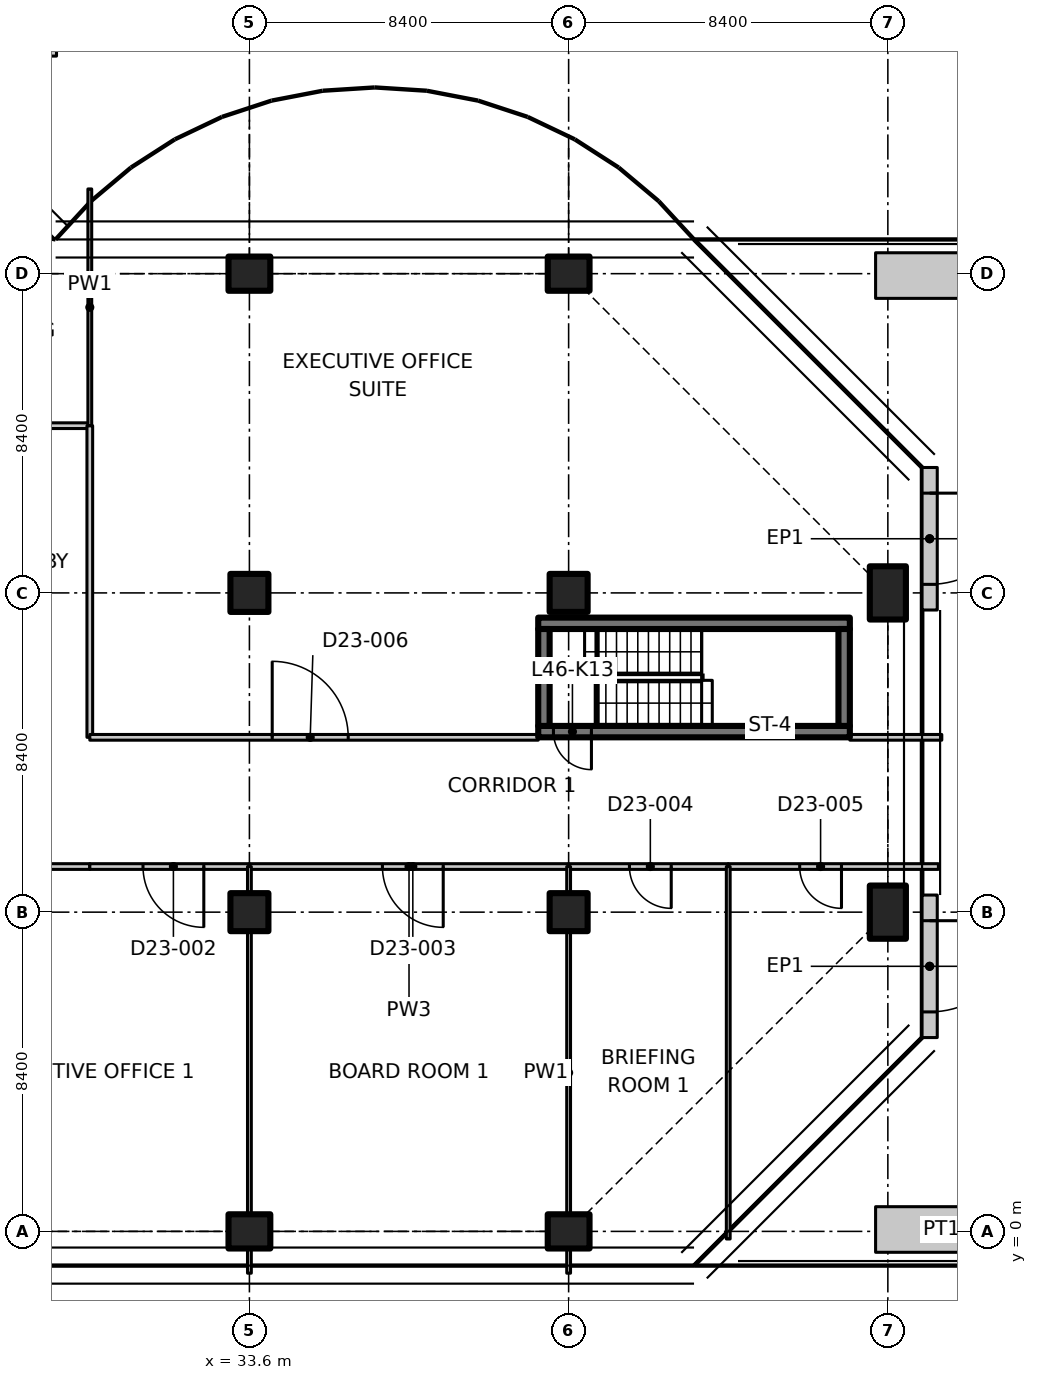
"""IFC4 building model, lengths in metres.
Left out: names, types, materials, properties, quantities, classifications, styles, units other than length and angle.
Written with IfcOpenShell. Run it as: python <this file> out.ifc"""

import sys

from ifc_helpers import new_model, si_unit, direction, frame, frame_2d, origin, origin_2d, place, context, subcontext, project, spatial, polyline, rectangle, outline, extrude, element, fill, save


model = new_model("IFC4")
c1 = context("Model", 3, precision=1e-05, world=origin(), true_north=direction((0.0, 1.0)))
c2 = subcontext(c1, "Body", "Model", "MODEL_VIEW")
j1 = project(units=[si_unit("LENGTHUNIT", "METRE"), si_unit("PLANEANGLEUNIT", "RADIAN")], contexts=[c1])
p1 = place(None, origin())
s1 = spatial("IfcSite", under=j1, at=p1, CompositionType="ELEMENT")
p2 = place(p1, origin())
s2 = spatial("IfcBuilding", under=s1, at=p2, CompositionType="ELEMENT")
p3 = place(p2, frame((0.0, 0.0, 184.8)))
s3 = spatial("IfcBuildingStorey", under=s2, at=p3, CompositionType="ELEMENT", Elevation=184.8)
p4 = place(p3, frame((33.6, 0.0, 0.0), z_axis=(0.0, 0.0, 1.0), x_axis=(0.0, 1.0, 0.0)))
e1 = element("IfcColumn", 1, at=p4, inside=s3, PredefinedType="COLUMN", context=c2, shape_type="SweptSolid", body=[
    extrude(rectangle(XDim=0.9, YDim=1.1, at=origin_2d()), origin(), (0.0, 0.0, 1.0), 3.35),
])
for number, where, z_axis, x_axis in (
    (2, (33.6, 8.4, 0.0), (0.0, 0.0, 1.0), (1.0, 0.0, 0.0)),
    (3, (33.6, 16.8, 0.0), (0.0, 0.0, 1.0), (1.0, 0.0, 0.0)),
):
    element("IfcColumn", number, at=place(p3, frame(where, z_axis=z_axis, x_axis=x_axis)), inside=s3, PredefinedType="COLUMN", context=c2, shape_type="SweptSolid", body=[
        extrude(rectangle(XDim=1.0, YDim=1.0, at=origin_2d()), origin(), (0.0, 0.0, 1.0), 3.35),
    ])
for number, where, z_axis, x_axis in (
    (4, (33.6, 25.2, 0.0), (0.0, 0.0, 1.0), (0.0, 1.0, 0.0)),
    (5, (42.0, 0.0, 0.0), (0.0, 0.0, 1.0), (0.0, 1.0, 0.0)),
):
    element("IfcColumn", number, at=place(p3, frame(where, z_axis=z_axis, x_axis=x_axis)), inside=s3, PredefinedType="COLUMN", context=c2, shape_type="SweptSolid", body=[
        extrude(rectangle(XDim=0.9, YDim=1.1, at=origin_2d()), origin(), (0.0, 0.0, 1.0), 3.35),
    ])
for number, where, z_axis, x_axis in (
    (6, (42.0, 8.4, 0.0), (0.0, 0.0, 1.0), (1.0, 0.0, 0.0)),
    (7, (42.0, 16.8, 0.0), (0.0, 0.0, 1.0), (1.0, 0.0, 0.0)),
):
    element("IfcColumn", number, at=place(p3, frame(where, z_axis=z_axis, x_axis=x_axis)), inside=s3, PredefinedType="COLUMN", context=c2, shape_type="SweptSolid", body=[
        extrude(rectangle(XDim=1.0, YDim=1.0, at=origin_2d()), origin(), (0.0, 0.0, 1.0), 3.35),
    ])
p5 = place(p3, frame((42.0, 25.2, 0.0), z_axis=(0.0, 0.0, 1.0), x_axis=(0.0, 1.0, 0.0)))
e8 = element("IfcColumn", 8, at=p5, inside=s3, PredefinedType="COLUMN", context=c2, shape_type="SweptSolid", body=[
    extrude(rectangle(XDim=0.9, YDim=1.1, at=origin_2d()), origin(), (0.0, 0.0, 1.0), 3.35),
])
for number, where, z_axis, x_axis in (
    (9, (50.4, 8.4, 0.0), (0.0, 0.0, 1.0), (1.0, 0.0, 0.0)),
    (10, (50.4, 16.8, 0.0), (0.0, 0.0, 1.0), (1.0, 0.0, 0.0)),
):
    element("IfcColumn", number, at=place(p3, frame(where, z_axis=z_axis, x_axis=x_axis)), inside=s3, PredefinedType="COLUMN", context=c2, shape_type="SweptSolid", body=[
        extrude(rectangle(XDim=0.95, YDim=1.4, at=origin_2d()), origin(), (0.0, 0.0, 1.0), 3.35),
    ])
p6 = place(p3, frame((51.5, 8.85, 0.0), z_axis=(0.0, 0.0, 1.0), x_axis=(0.0, -1.0, 0.0)))
e11 = element("IfcWall", 11, at=p6, inside=s3, PredefinedType="SOLIDWALL", context=c2, shape_type="SweptSolid", body=[
    extrude(rectangle(XDim=3.75, YDim=0.4, at=frame_2d((1.875, 0.0))), origin(), (0.0, 0.0, 1.0), 3.35),
])
p7 = place(p6, frame((0.675, 0.0, 0.0)))
e12 = element("IfcOpeningElement", 12, at=p7, cuts=e11, PredefinedType="OPENING", context=c2, shape_type="SweptSolid", body=[
    extrude(rectangle(XDim=2.4, YDim=2.7, at=frame_2d((1.2, 1.35))), frame((0.0, 0.21, 0.0), z_axis=(0.0, -1.0, 0.0), x_axis=(1.0, 0.0, 0.0)), (0.0, 0.0, 1.0), 0.42),
])
p8 = place(p3, frame((51.5, 20.1, 0.0), z_axis=(0.0, 0.0, 1.0), x_axis=(0.0, -1.0, 0.0)))
e13 = element("IfcWall", 13, at=p8, inside=s3, PredefinedType="SOLIDWALL", context=c2, shape_type="SweptSolid", body=[
    extrude(rectangle(XDim=3.75, YDim=0.4, at=frame_2d((1.875, 0.0))), origin(), (0.0, 0.0, 1.0), 3.35),
])
p9 = place(p8, frame((0.675, 0.0, 0.0)))
e14 = element("IfcOpeningElement", 14, at=p9, cuts=e13, PredefinedType="OPENING", context=c2, shape_type="SweptSolid", body=[
    extrude(rectangle(XDim=2.4, YDim=2.7, at=frame_2d((1.2, 1.35))), frame((0.0, 0.21, 0.0), z_axis=(0.0, -1.0, 0.0), x_axis=(1.0, 0.0, 0.0)), (0.0, 0.0, 1.0), 0.42),
])
p10 = place(p3, frame((50.077, 0.05, 0.0), z_axis=(0.0, 0.0, 1.0), x_axis=(1.0, 0.0, 0.0)))
e15 = element("IfcWall", 15, at=p10, inside=s3, PredefinedType="PARAPET", context=c2, shape_type="SweptSolid", body=[
    extrude(rectangle(XDim=3.478, YDim=1.2, at=frame_2d((1.739, 0.0))), origin(), (0.0, 0.0, 1.0), 1.3),
])
p11 = place(p3, frame((52.707, 25.15, 0.0), z_axis=(0.0, 0.0, 1.0), x_axis=(-1.0, 0.0, 0.0)))
e16 = element("IfcWall", 16, at=p11, inside=s3, PredefinedType="PARAPET", context=c2, shape_type="SweptSolid", body=[
    extrude(rectangle(XDim=2.629, YDim=1.2, at=frame_2d((1.314, 0.0))), origin(), (0.0, 0.0, 1.0), 1.3),
])
p12 = place(p3, frame((49.4, 13.15, 0.0), z_axis=(0.0, 0.0, 1.0), x_axis=(-1.0, 0.0, 0.0)))
e17 = element("IfcWall", 17, at=p12, inside=s3, PredefinedType="SHEAR", context=c2, shape_type="SweptSolid", body=[
    extrude(rectangle(XDim=8.2, YDim=0.3, at=frame_2d((4.1, 0.0))), origin(), (0.0, 0.0, 1.0), 3.35),
])
p13 = place(p12, frame((6.8, 0.0, 0.0)))
e18 = element("IfcOpeningElement", 18, at=p13, cuts=e17, PredefinedType="OPENING", context=c2, shape_type="SweptSolid", body=[
    extrude(rectangle(XDim=1.0, YDim=2.1, at=frame_2d((0.5, 1.05))), frame((0.0, 0.16, 0.0), z_axis=(0.0, -1.0, 0.0), x_axis=(1.0, 0.0, 0.0)), (0.0, 0.0, 1.0), 0.32),
])
p14 = place(p3, frame((41.2, 16.0, 0.0), z_axis=(0.0, 0.0, 1.0), x_axis=(1.0, 0.0, 0.0)))
e19 = element("IfcWall", 19, at=p14, inside=s3, PredefinedType="SHEAR", context=c2, shape_type="SweptSolid", body=[
    extrude(rectangle(XDim=8.2, YDim=0.3, at=frame_2d((4.1, 0.0))), origin(), (0.0, 0.0, 1.0), 3.35),
])
for number, where, z_axis, x_axis in (
    (20, (41.35, 13.3, 0.0), (0.0, 0.0, 1.0), (0.0, 1.0, 0.0)),
    (21, (49.25, 13.3, 0.0), (0.0, 0.0, 1.0), (0.0, 1.0, 0.0)),
):
    element("IfcWall", number, at=place(p3, frame(where, z_axis=z_axis, x_axis=x_axis)), inside=s3, PredefinedType="SHEAR", context=c2, shape_type="SweptSolid", body=[
        extrude(rectangle(XDim=2.55, YDim=0.3, at=frame_2d((1.275, 0.0))), origin(), (0.0, 0.0, 1.0), 3.35),
    ])
for number, where, z_axis, x_axis in (
    (22, (25.2, 21.2, 0.0), (0.0, 0.0, 1.0), (1.0, 0.0, 0.0)),
    (23, (29.4, 9.6, 0.0), (0.0, 0.0, 1.0), (-1.0, 0.0, 0.0)),
):
    element("IfcWall", number, at=place(p3, frame(where, z_axis=z_axis, x_axis=x_axis)), inside=s3, PredefinedType="PARTITIONING", context=c2, shape_type="SweptSolid", body=[
        extrude(rectangle(XDim=4.2, YDim=0.15, at=frame_2d((2.1, 0.0))), origin(), (0.0, 0.0, 1.0), 3.33),
    ])
p15 = place(p3, frame((29.4, 21.2, 0.0), z_axis=(0.0, 0.0, 1.0), x_axis=(0.0, -1.0, 0.0)))
e24 = element("IfcWall", 24, at=p15, inside=s3, PredefinedType="PARTITIONING", context=c2, shape_type="SweptSolid", body=[
    extrude(rectangle(XDim=8.2, YDim=0.15, at=frame_2d((4.1, 0.0))), origin(), (0.0, 0.0, 1.0), 3.33),
])
p16 = place(p3, frame((29.4, 27.429, 0.0), z_axis=(0.0, 0.0, 1.0), x_axis=(0.0, -1.0, 0.0)))
e25 = element("IfcWall", 25, at=p16, inside=s3, PredefinedType="PARTITIONING", context=c2, shape_type="SweptSolid", body=[
    extrude(outline(polyline([(0.0, 0.0), (6.229, 0.0), (6.229, 3.33), (2.679, 3.33), (2.677, 2.98), (1.781, 2.98), (1.779, 3.33), (0.154, 3.33), (0.0, 3.33), (0.0, 0.0)])), frame((0.0, 0.05, 0.0), z_axis=(0.0, -1.0, 0.0), x_axis=(1.0, 0.0, 0.0)), (0.0, 0.0, 1.0), 0.1),
])
p17 = place(p3, frame((25.2, 31.0, 0.0), z_axis=(0.0, 0.0, 1.0), x_axis=(1.0, 0.0, 0.0)))
e26 = element("IfcWall", 26, at=p17, inside=s3, PredefinedType="PARTITIONING", context=c2, shape_type="SweptSolid", body=[
    extrude(rectangle(XDim=3.324, YDim=0.15, at=frame_2d((1.662, 0.0))), origin(), (0.0, 0.0, 1.0), 2.98),
])
p18 = place(p3, frame((33.6, 9.6, 0.0), z_axis=(0.0, 0.0, 1.0), x_axis=(-1.0, 0.0, 0.0)))
e27 = element("IfcWall", 27, at=p18, inside=s3, PredefinedType="PARTITIONING", context=c2, shape_type="SweptSolid", body=[
    extrude(rectangle(XDim=4.2, YDim=0.15, at=frame_2d((2.1, 0.0))), origin(), (0.0, 0.0, 1.0), 3.33),
])
p19 = place(p18, frame((1.2, 0.0, 0.0)))
e28 = element("IfcOpeningElement", 28, at=p19, cuts=e27, PredefinedType="OPENING", context=c2, shape_type="SweptSolid", body=[
    extrude(rectangle(XDim=1.6, YDim=2.1, at=frame_2d((0.8, 1.05))), frame((0.0, 0.085, 0.0), z_axis=(0.0, -1.0, 0.0), x_axis=(1.0, 0.0, 0.0)), (0.0, 0.0, 1.0), 0.17),
])
p20 = place(p3, frame((42.0, 9.6, 0.0), z_axis=(0.0, 0.0, 1.0), x_axis=(-1.0, 0.0, 0.0)))
e29 = element("IfcWall", 29, at=p20, inside=s3, PredefinedType="PARTITIONING", context=c2, shape_type="SweptSolid", body=[
    extrude(rectangle(XDim=8.4, YDim=0.15, at=frame_2d((4.2, 0.0))), origin(), (0.0, 0.0, 1.0), 3.33),
])
p21 = place(p20, frame((3.3, 0.0, 0.0)))
e30 = element("IfcOpeningElement", 30, at=p21, cuts=e29, PredefinedType="OPENING", context=c2, shape_type="SweptSolid", body=[
    extrude(rectangle(XDim=1.6, YDim=2.1, at=frame_2d((0.8, 1.05))), frame((0.0, 0.085, 0.0), z_axis=(0.0, -1.0, 0.0), x_axis=(1.0, 0.0, 0.0)), (0.0, 0.0, 1.0), 0.17),
])
p22 = place(p3, frame((46.2, 9.6, 0.0), z_axis=(0.0, 0.0, 1.0), x_axis=(-1.0, 0.0, 0.0)))
e31 = element("IfcWall", 31, at=p22, inside=s3, PredefinedType="PARTITIONING", context=c2, shape_type="SweptSolid", body=[
    extrude(rectangle(XDim=4.2, YDim=0.15, at=frame_2d((2.1, 0.0))), origin(), (0.0, 0.0, 1.0), 3.33),
])
p23 = place(p22, frame((1.5, 0.0, 0.0)))
e32 = element("IfcOpeningElement", 32, at=p23, cuts=e31, PredefinedType="OPENING", context=c2, shape_type="SweptSolid", body=[
    extrude(rectangle(XDim=1.1, YDim=2.1, at=frame_2d((0.55, 1.05))), frame((0.0, 0.085, 0.0), z_axis=(0.0, -1.0, 0.0), x_axis=(1.0, 0.0, 0.0)), (0.0, 0.0, 1.0), 0.17),
])
p24 = place(p3, frame((51.73, 9.6, 0.0), z_axis=(0.0, 0.0, 1.0), x_axis=(-1.0, 0.0, 0.0)))
e33 = element("IfcWall", 33, at=p24, inside=s3, PredefinedType="PARTITIONING", context=c2, shape_type="SweptSolid", body=[
    extrude(outline(polyline([(0.0, 0.0), (5.531, 0.0), (5.531, 3.33), (1.781, 3.33), (1.779, 2.98), (0.883, 2.98), (0.881, 3.33), (0.25, 3.33), (0.0, 3.33), (0.0, 0.0)])), frame((0.0, 0.075, 0.0), z_axis=(0.0, -1.0, 0.0), x_axis=(1.0, 0.0, 0.0)), (0.0, 0.0, 1.0), 0.15),
])
p25 = place(p24, frame((2.551, 0.0, 0.0)))
e34 = element("IfcOpeningElement", 34, at=p25, cuts=e33, PredefinedType="OPENING", context=c2, shape_type="SweptSolid", body=[
    extrude(rectangle(XDim=1.1, YDim=2.1, at=frame_2d((0.55, 1.05))), frame((0.0, 0.085, 0.0), z_axis=(0.0, -1.0, 0.0), x_axis=(1.0, 0.0, 0.0)), (0.0, 0.0, 1.0), 0.17),
])
p26 = place(p3, frame((29.4, 13.0, 0.0), z_axis=(0.0, 0.0, 1.0), x_axis=(1.0, 0.0, 0.0)))
e35 = element("IfcWall", 35, at=p26, inside=s3, PredefinedType="PARTITIONING", context=c2, shape_type="SweptSolid", body=[
    extrude(rectangle(XDim=11.8, YDim=0.15, at=frame_2d((5.9, 0.0))), origin(), (0.0, 0.0, 1.0), 3.33),
])
p27 = place(p26, frame((4.8, 0.0, 0.0)))
e36 = element("IfcOpeningElement", 36, at=p27, cuts=e35, PredefinedType="OPENING", context=c2, shape_type="SweptSolid", body=[
    extrude(rectangle(XDim=2.0, YDim=2.4, at=frame_2d((1.0, 1.2))), frame((0.0, 0.085, 0.0), z_axis=(0.0, -1.0, 0.0), x_axis=(1.0, 0.0, 0.0)), (0.0, 0.0, 1.0), 0.17),
])
p28 = place(p3, frame((49.4, 13.0, 0.0), z_axis=(0.0, 0.0, 1.0), x_axis=(1.0, 0.0, 0.0)))
e37 = element("IfcWall", 37, at=p28, inside=s3, PredefinedType="PARTITIONING", context=c2, shape_type="SweptSolid", body=[
    extrude(rectangle(XDim=2.42, YDim=0.15, at=frame_2d((1.21, 0.0))), origin(), (0.0, 0.0, 1.0), 2.98),
])
p29 = place(p3, frame((33.6, 9.6, 0.0), z_axis=(0.0, 0.0, 1.0), x_axis=(0.0, -1.0, 0.0)))
e38 = element("IfcWall", 38, at=p29, inside=s3, PredefinedType="PARTITIONING", context=c2, shape_type="SweptSolid", body=[
    extrude(rectangle(XDim=0.68, YDim=0.1, at=frame_2d((0.34, 0.0))), origin(), (0.0, 0.0, 1.0), 3.33),
])
p30 = place(p3, frame((33.6, 7.88, 0.0), z_axis=(0.0, 0.0, 1.0), x_axis=(0.0, -1.0, 0.0)))
e39 = element("IfcWall", 39, at=p30, inside=s3, PredefinedType="PARTITIONING", context=c2, shape_type="SweptSolid", body=[
    extrude(rectangle(XDim=7.41, YDim=0.1, at=frame_2d((3.705, 0.0))), origin(), (0.0, 0.0, 1.0), 3.33),
])
p31 = place(p3, frame((33.6, -0.47, 0.0), z_axis=(0.0, 0.0, 1.0), x_axis=(0.0, -1.0, 0.0)))
e40 = element("IfcWall", 40, at=p31, inside=s3, PredefinedType="PARTITIONING", context=c2, shape_type="SweptSolid", body=[
    extrude(rectangle(XDim=0.63, YDim=0.1, at=frame_2d((0.315, 0.0))), origin(), (0.0, 0.0, 1.0), 3.33),
])
p32 = place(p3, frame((42.0, 9.6, 0.0), z_axis=(0.0, 0.0, 1.0), x_axis=(0.0, -1.0, 0.0)))
e41 = element("IfcWall", 41, at=p32, inside=s3, PredefinedType="PARTITIONING", context=c2, shape_type="SweptSolid", body=[
    extrude(rectangle(XDim=0.68, YDim=0.1, at=frame_2d((0.34, 0.0))), origin(), (0.0, 0.0, 1.0), 3.33),
])
p33 = place(p3, frame((42.0, 7.88, 0.0), z_axis=(0.0, 0.0, 1.0), x_axis=(0.0, -1.0, 0.0)))
e42 = element("IfcWall", 42, at=p33, inside=s3, PredefinedType="PARTITIONING", context=c2, shape_type="SweptSolid", body=[
    extrude(outline(polyline([(0.0, 0.0), (7.41, 0.0), (7.41, 2.98), (7.216, 2.98), (7.214, 3.33), (0.0, 3.33), (0.0, 0.0)])), frame((0.0, 0.05, 0.0), z_axis=(0.0, -1.0, 0.0), x_axis=(1.0, 0.0, 0.0)), (0.0, 0.0, 1.0), 0.1),
])
p34 = place(p3, frame((42.0, -0.47, 0.0), z_axis=(0.0, 0.0, 1.0), x_axis=(0.0, -1.0, 0.0)))
e43 = element("IfcWall", 43, at=p34, inside=s3, PredefinedType="PARTITIONING", context=c2, shape_type="SweptSolid", body=[
    extrude(rectangle(XDim=0.63, YDim=0.1, at=frame_2d((0.315, 0.0))), origin(), (0.0, 0.0, 1.0), 3.33),
])
p35 = place(p3, frame((46.2, 9.6, 0.0), z_axis=(0.0, 0.0, 1.0), x_axis=(0.0, -1.0, 0.0)))
e44 = element("IfcWall", 44, at=p35, inside=s3, PredefinedType="PARTITIONING", context=c2, shape_type="SweptSolid", body=[
    extrude(outline(polyline([(0.0, 0.0), (9.8, 0.0), (9.8, 3.33), (6.066, 3.33), (6.064, 2.98), (4.736, 2.98), (4.734, 3.33), (0.0, 3.33), (0.0, 0.0)])), frame((0.0, 0.05, 0.0), z_axis=(0.0, -1.0, 0.0), x_axis=(1.0, 0.0, 0.0)), (0.0, 0.0, 1.0), 0.1),
])
p36 = place(p7, origin())
e45 = element("IfcDoor", 45, at=p36, inside=s3, OperationType="DOUBLE_DOOR_SINGLE_SWING", PredefinedType="DOOR", context=c2, shape_type="SweptSolid", body=[
    extrude(rectangle(XDim=2.4, YDim=2.7, at=frame_2d((1.2, 1.35))), frame((0.0, 0.025, 0.0), z_axis=(0.0, -1.0, 0.0), x_axis=(1.0, 0.0, 0.0)), (0.0, 0.0, 1.0), 0.05),
])
fill(e12, e45)
p37 = place(p9, origin())
e46 = element("IfcDoor", 46, at=p37, inside=s3, OperationType="DOUBLE_DOOR_SINGLE_SWING", PredefinedType="DOOR", context=c2, shape_type="SweptSolid", body=[
    extrude(rectangle(XDim=2.4, YDim=2.7, at=frame_2d((1.2, 1.35))), frame((0.0, 0.025, 0.0), z_axis=(0.0, -1.0, 0.0), x_axis=(1.0, 0.0, 0.0)), (0.0, 0.0, 1.0), 0.05),
])
fill(e14, e46)
p38 = place(p13, origin())
e47 = element("IfcDoor", 47, at=p38, inside=s3, OperationType="SINGLE_SWING_RIGHT", PredefinedType="DOOR", context=c2, shape_type="SweptSolid", body=[
    extrude(rectangle(XDim=1.0, YDim=2.1, at=frame_2d((0.5, 1.05))), frame((0.0, 0.025, 0.0), z_axis=(0.0, -1.0, 0.0), x_axis=(1.0, 0.0, 0.0)), (0.0, 0.0, 1.0), 0.05),
])
fill(e18, e47)
p39 = place(p19, origin())
e48 = element("IfcDoor", 48, at=p39, inside=s3, OperationType="DOUBLE_DOOR_SINGLE_SWING", PredefinedType="DOOR", context=c2, shape_type="SweptSolid", body=[
    extrude(rectangle(XDim=1.6, YDim=2.1, at=frame_2d((0.8, 1.05))), frame((0.0, 0.025, 0.0), z_axis=(0.0, -1.0, 0.0), x_axis=(1.0, 0.0, 0.0)), (0.0, 0.0, 1.0), 0.05),
])
fill(e28, e48)
p40 = place(p21, origin())
e49 = element("IfcDoor", 49, at=p40, inside=s3, OperationType="DOUBLE_DOOR_SINGLE_SWING", PredefinedType="DOOR", context=c2, shape_type="SweptSolid", body=[
    extrude(rectangle(XDim=1.6, YDim=2.1, at=frame_2d((0.8, 1.05))), frame((0.0, 0.025, 0.0), z_axis=(0.0, -1.0, 0.0), x_axis=(1.0, 0.0, 0.0)), (0.0, 0.0, 1.0), 0.05),
])
fill(e30, e49)
p41 = place(p23, origin())
e50 = element("IfcDoor", 50, at=p41, inside=s3, OperationType="SINGLE_SWING_LEFT", PredefinedType="DOOR", context=c2, shape_type="SweptSolid", body=[
    extrude(rectangle(XDim=1.1, YDim=2.1, at=frame_2d((0.55, 1.05))), frame((0.0, 0.025, 0.0), z_axis=(0.0, -1.0, 0.0), x_axis=(1.0, 0.0, 0.0)), (0.0, 0.0, 1.0), 0.05),
])
fill(e32, e50)
p42 = place(p25, origin())
e51 = element("IfcDoor", 51, at=p42, inside=s3, OperationType="SINGLE_SWING_LEFT", PredefinedType="DOOR", context=c2, shape_type="SweptSolid", body=[
    extrude(rectangle(XDim=1.1, YDim=2.1, at=frame_2d((0.55, 1.05))), frame((0.0, 0.025, 0.0), z_axis=(0.0, -1.0, 0.0), x_axis=(1.0, 0.0, 0.0)), (0.0, 0.0, 1.0), 0.05),
])
fill(e34, e51)
p43 = place(p27, origin())
e52 = element("IfcDoor", 52, at=p43, inside=s3, OperationType="DOUBLE_DOOR_SINGLE_SWING", PredefinedType="DOOR", context=c2, shape_type="SweptSolid", body=[
    extrude(rectangle(XDim=2.0, YDim=2.4, at=frame_2d((1.0, 1.2))), frame((0.0, 0.025, 0.0), z_axis=(0.0, -1.0, 0.0), x_axis=(1.0, 0.0, 0.0)), (0.0, 0.0, 1.0), 0.05),
])
fill(e36, e52)
save(model, sys.argv[1])
